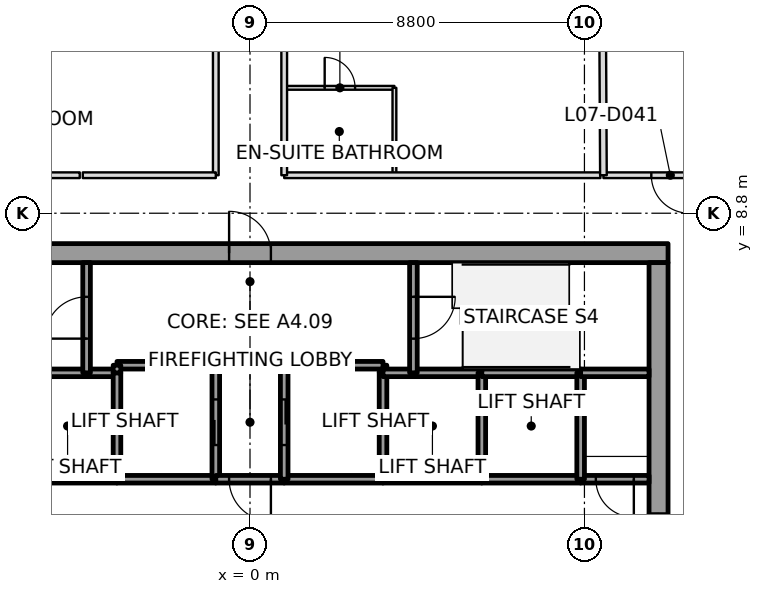
"""IFC4 building model, lengths in metres.
Left out: names, types, materials, properties, quantities, classifications, styles, units other than length and angle.
Written with IfcOpenShell. Run it as: python <this file> out.ifc"""

import sys

from ifc_helpers import new_model, si_unit, direction, frame, frame_2d, origin, place, context, subcontext, project, spatial, rectangle, extrude, element, fill, save


model = new_model("IFC4")
c1 = context("Model", 3, precision=1e-05, world=origin(), true_north=direction((0.0, 1.0)))
c2 = subcontext(c1, "Body", "Model", "MODEL_VIEW")
j1 = project(units=[si_unit("LENGTHUNIT", "METRE"), si_unit("PLANEANGLEUNIT", "RADIAN")], contexts=[c1])
p1 = place(None, origin())
s1 = spatial("IfcSite", under=j1, at=p1, CompositionType="ELEMENT")
p2 = place(p1, origin())
s2 = spatial("IfcBuilding", under=s1, at=p2, CompositionType="ELEMENT")
p3 = place(p2, frame((0.0, 0.0, 48.0)))
s3 = spatial("IfcBuildingStorey", under=s2, at=p3, CompositionType="ELEMENT", Elevation=48.0)
p4 = place(p3, frame((-11.0, 7.75, 0.0), z_axis=(0.0, 0.0, 1.0), x_axis=(1.0, 0.0, 0.0)))
e1 = element("IfcWall", 1, at=p4, inside=s3, PredefinedType="SHEAR", context=c2, shape_type="SweptSolid", body=[
    extrude(rectangle(XDim=22.0, YDim=0.5, at=frame_2d((11.0, 0.0))), origin(), (0.0, 0.0, 1.0), 3.7),
])
p5 = place(p4, frame((10.45, 0.0, 0.0)))
e2 = element("IfcOpeningElement", 2, at=p5, cuts=e1, PredefinedType="OPENING", context=c2, shape_type="SweptSolid", body=[
    extrude(rectangle(XDim=1.1, YDim=2.1, at=frame_2d((0.55, 1.05))), frame((0.0, 0.25, 0.0), z_axis=(0.0, -1.0, 0.0), x_axis=(1.0, 0.0, 0.0)), (0.0, 0.0, 1.0), 0.5),
])
p6 = place(p3, frame((10.75, -7.5, 0.0), z_axis=(0.0, 0.0, 1.0), x_axis=(0.0, 1.0, 0.0)))
e3 = element("IfcWall", 3, at=p6, inside=s3, PredefinedType="SHEAR", context=c2, shape_type="SweptSolid", body=[
    extrude(rectangle(XDim=15.0, YDim=0.5, at=frame_2d((7.5, 0.0))), origin(), (0.0, 0.0, 1.0), 3.7),
])
p7 = place(p6, frame((6.6, 0.0, 0.0)))
e4 = element("IfcOpeningElement", 4, at=p7, cuts=e3, PredefinedType="OPENING", context=c2, shape_type="SweptSolid", body=[
    extrude(rectangle(XDim=1.8, YDim=2.1, at=frame_2d((0.9, 1.05))), frame((0.0, 0.25, 0.0), z_axis=(0.0, -1.0, 0.0), x_axis=(1.0, 0.0, 0.0)), (0.0, 0.0, 1.0), 0.5),
])
p8 = place(p3, frame((-3.5, 1.8, 0.0), z_axis=(0.0, 0.0, 1.0), x_axis=(-1.0, 0.0, 0.0)))
e5 = element("IfcWall", 5, at=p8, inside=s3, PredefinedType="SOLIDWALL", context=c2, shape_type="SweptSolid", body=[
    extrude(rectangle(XDim=2.6, YDim=0.2, at=frame_2d((1.3, 0.0))), origin(), (0.0, 0.0, 1.0), 3.55),
])
p9 = place(p3, frame((-4.3, 4.6, 0.0), z_axis=(0.0, 0.0, 1.0), x_axis=(-1.0, 0.0, 0.0)))
e6 = element("IfcWall", 6, at=p9, inside=s3, PredefinedType="SOLIDWALL", context=c2, shape_type="SweptSolid", body=[
    extrude(rectangle(XDim=1.8, YDim=0.2, at=frame_2d((0.9, 0.0))), origin(), (0.0, 0.0, 1.0), 3.55),
])
p10 = place(p3, frame((-3.5, 4.6, 0.0), z_axis=(0.0, 0.0, 1.0), x_axis=(-1.0, 0.0, 0.0)))
e7 = element("IfcWall", 7, at=p10, inside=s3, PredefinedType="SOLIDWALL", context=c2, shape_type="SweptSolid", body=[
    extrude(rectangle(XDim=0.8, YDim=0.2, at=frame_2d((0.4, 0.0))), origin(), (0.0, 0.0, 1.0), 3.55),
])
p11 = place(p3, frame((-4.3, 4.6, 0.0), z_axis=(0.0, 0.0, 1.0), x_axis=(0.0, 1.0, 0.0)))
e8 = element("IfcWall", 8, at=p11, inside=s3, PredefinedType="SOLIDWALL", context=c2, shape_type="SweptSolid", body=[
    extrude(rectangle(XDim=2.9, YDim=0.2, at=frame_2d((1.45, 0.0))), origin(), (0.0, 0.0, 1.0), 3.55),
])
p12 = place(p11, frame((0.9, 0.0, 0.0)))
e9 = element("IfcOpeningElement", 9, at=p12, cuts=e8, PredefinedType="OPENING", context=c2, shape_type="SweptSolid", body=[
    extrude(rectangle(XDim=1.1, YDim=2.1, at=frame_2d((0.55, 1.05))), frame((0.0, 0.1, 0.0), z_axis=(0.0, -1.0, 0.0), x_axis=(1.0, 0.0, 0.0)), (0.0, 0.0, 1.0), 0.2),
])
p13 = place(p3, frame((-0.9, 1.8, 0.0), z_axis=(0.0, 0.0, 1.0), x_axis=(-1.0, 0.0, 0.0)))
e10 = element("IfcWall", 10, at=p13, inside=s3, PredefinedType="SOLIDWALL", context=c2, shape_type="SweptSolid", body=[
    extrude(rectangle(XDim=2.6, YDim=0.2, at=frame_2d((1.3, 0.0))), origin(), (0.0, 0.0, 1.0), 3.55),
])
p14 = place(p3, frame((-3.5, 4.6, 0.0), z_axis=(0.0, 0.0, 1.0), x_axis=(0.0, -1.0, 0.0)))
e11 = element("IfcWall", 11, at=p14, inside=s3, PredefinedType="SOLIDWALL", context=c2, shape_type="SweptSolid", body=[
    extrude(rectangle(XDim=2.8, YDim=0.2, at=frame_2d((1.4, 0.0))), origin(), (0.0, 0.0, 1.0), 3.55),
])
p15 = place(p3, frame((-0.9, 1.8, 0.0), z_axis=(0.0, 0.0, 1.0), x_axis=(0.0, 1.0, 0.0)))
e12 = element("IfcWall", 12, at=p15, inside=s3, PredefinedType="SOLIDWALL", context=c2, shape_type="SweptSolid", body=[
    extrude(rectangle(XDim=3.0, YDim=0.2, at=frame_2d((1.5, 0.0))), origin(), (0.0, 0.0, 1.0), 3.55),
])
p16 = place(p15, frame((0.9, 0.0, 0.0)))
e13 = element("IfcOpeningElement", 13, at=p16, cuts=e12, PredefinedType="OPENING", context=c2, shape_type="SweptSolid", body=[
    extrude(rectangle(XDim=1.2, YDim=2.1, at=frame_2d((0.6, 1.05))), frame((0.0, 0.1, 0.0), z_axis=(0.0, -1.0, 0.0), x_axis=(1.0, 0.0, 0.0)), (0.0, 0.0, 1.0), 0.2),
])
p17 = place(p3, frame((-0.9, 4.8, 0.0), z_axis=(0.0, 0.0, 1.0), x_axis=(-1.0, 0.0, 0.0)))
e14 = element("IfcWall", 14, at=p17, inside=s3, PredefinedType="SOLIDWALL", context=c2, shape_type="SweptSolid", body=[
    extrude(rectangle(XDim=2.6, YDim=0.2, at=frame_2d((1.3, 0.0))), origin(), (0.0, 0.0, 1.0), 3.55),
])
p18 = place(p3, frame((-3.5, 4.8, 0.0), z_axis=(0.0, 0.0, 1.0), x_axis=(0.0, -1.0, 0.0)))
e15 = element("IfcWall", 15, at=p18, inside=s3, PredefinedType="SOLIDWALL", context=c2, shape_type="SweptSolid", body=[
    extrude(rectangle(XDim=0.2, YDim=0.2, at=frame_2d((0.1, 0.0))), origin(), (0.0, 0.0, 1.0), 3.55),
])
p19 = place(p3, frame((0.9, 1.8, 0.0), z_axis=(0.0, 0.0, 1.0), x_axis=(-1.0, 0.0, 0.0)))
e16 = element("IfcWall", 16, at=p19, inside=s3, PredefinedType="SOLIDWALL", context=c2, shape_type="SweptSolid", body=[
    extrude(rectangle(XDim=1.8, YDim=0.2, at=frame_2d((0.9, 0.0))), origin(), (0.0, 0.0, 1.0), 3.55),
])
p20 = place(p19, frame((0.35, 0.0, 0.0)))
e17 = element("IfcOpeningElement", 17, at=p20, cuts=e16, PredefinedType="OPENING", context=c2, shape_type="SweptSolid", body=[
    extrude(rectangle(XDim=1.1, YDim=2.1, at=frame_2d((0.55, 1.05))), frame((0.0, 0.1, 0.0), z_axis=(0.0, -1.0, 0.0), x_axis=(1.0, 0.0, 0.0)), (0.0, 0.0, 1.0), 0.2),
])
p21 = place(p3, frame((3.5, 1.8, 0.0), z_axis=(0.0, 0.0, 1.0), x_axis=(-1.0, 0.0, 0.0)))
e18 = element("IfcWall", 18, at=p21, inside=s3, PredefinedType="SOLIDWALL", context=c2, shape_type="SweptSolid", body=[
    extrude(rectangle(XDim=2.6, YDim=0.2, at=frame_2d((1.3, 0.0))), origin(), (0.0, 0.0, 1.0), 3.55),
])
p22 = place(p3, frame((3.5, 4.6, 0.0), z_axis=(0.0, 0.0, 1.0), x_axis=(0.0, 1.0, 0.0)))
e19 = element("IfcWall", 19, at=p22, inside=s3, PredefinedType="SOLIDWALL", context=c2, shape_type="SweptSolid", body=[
    extrude(rectangle(XDim=0.2, YDim=0.2, at=frame_2d((0.1, 0.0))), origin(), (0.0, 0.0, 1.0), 3.55),
])
p23 = place(p3, frame((3.5, 4.8, 0.0), z_axis=(0.0, 0.0, 1.0), x_axis=(-1.0, 0.0, 0.0)))
e20 = element("IfcWall", 20, at=p23, inside=s3, PredefinedType="SOLIDWALL", context=c2, shape_type="SweptSolid", body=[
    extrude(rectangle(XDim=2.6, YDim=0.2, at=frame_2d((1.3, 0.0))), origin(), (0.0, 0.0, 1.0), 3.55),
])
p24 = place(p3, frame((0.9, 4.8, 0.0), z_axis=(0.0, 0.0, 1.0), x_axis=(0.0, -1.0, 0.0)))
e21 = element("IfcWall", 21, at=p24, inside=s3, PredefinedType="SOLIDWALL", context=c2, shape_type="SweptSolid", body=[
    extrude(rectangle(XDim=3.0, YDim=0.2, at=frame_2d((1.5, 0.0))), origin(), (0.0, 0.0, 1.0), 3.55),
])
p25 = place(p24, frame((0.9, 0.0, 0.0)))
e22 = element("IfcOpeningElement", 22, at=p25, cuts=e21, PredefinedType="OPENING", context=c2, shape_type="SweptSolid", body=[
    extrude(rectangle(XDim=1.2, YDim=2.1, at=frame_2d((0.6, 1.05))), frame((0.0, 0.1, 0.0), z_axis=(0.0, -1.0, 0.0), x_axis=(1.0, 0.0, 0.0)), (0.0, 0.0, 1.0), 0.2),
])
p26 = place(p3, frame((6.1, 1.8, 0.0), z_axis=(0.0, 0.0, 1.0), x_axis=(-1.0, 0.0, 0.0)))
e23 = element("IfcWall", 23, at=p26, inside=s3, PredefinedType="SOLIDWALL", context=c2, shape_type="SweptSolid", body=[
    extrude(rectangle(XDim=2.6, YDim=0.2, at=frame_2d((1.3, 0.0))), origin(), (0.0, 0.0, 1.0), 3.55),
])
p27 = place(p3, frame((3.5, 1.8, 0.0), z_axis=(0.0, 0.0, 1.0), x_axis=(0.0, 1.0, 0.0)))
e24 = element("IfcWall", 24, at=p27, inside=s3, PredefinedType="SOLIDWALL", context=c2, shape_type="SweptSolid", body=[
    extrude(rectangle(XDim=2.8, YDim=0.2, at=frame_2d((1.4, 0.0))), origin(), (0.0, 0.0, 1.0), 3.55),
])
p28 = place(p3, frame((4.3, 4.6, 0.0), z_axis=(0.0, 0.0, 1.0), x_axis=(-1.0, 0.0, 0.0)))
e25 = element("IfcWall", 25, at=p28, inside=s3, PredefinedType="SOLIDWALL", context=c2, shape_type="SweptSolid", body=[
    extrude(rectangle(XDim=0.8, YDim=0.2, at=frame_2d((0.4, 0.0))), origin(), (0.0, 0.0, 1.0), 3.55),
])
p29 = place(p3, frame((6.1, 4.6, 0.0), z_axis=(0.0, 0.0, 1.0), x_axis=(-1.0, 0.0, 0.0)))
e26 = element("IfcWall", 26, at=p29, inside=s3, PredefinedType="SOLIDWALL", context=c2, shape_type="SweptSolid", body=[
    extrude(rectangle(XDim=1.8, YDim=0.2, at=frame_2d((0.9, 0.0))), origin(), (0.0, 0.0, 1.0), 3.55),
])
p30 = place(p3, frame((4.3, 7.5, 0.0), z_axis=(0.0, 0.0, 1.0), x_axis=(0.0, -1.0, 0.0)))
e27 = element("IfcWall", 27, at=p30, inside=s3, PredefinedType="SOLIDWALL", context=c2, shape_type="SweptSolid", body=[
    extrude(rectangle(XDim=2.9, YDim=0.2, at=frame_2d((1.45, 0.0))), origin(), (0.0, 0.0, 1.0), 3.55),
])
p31 = place(p30, frame((0.9, 0.0, 0.0)))
e28 = element("IfcOpeningElement", 28, at=p31, cuts=e27, PredefinedType="OPENING", context=c2, shape_type="SweptSolid", body=[
    extrude(rectangle(XDim=1.1, YDim=2.1, at=frame_2d((0.55, 1.05))), frame((0.0, 0.1, 0.0), z_axis=(0.0, -1.0, 0.0), x_axis=(1.0, 0.0, 0.0)), (0.0, 0.0, 1.0), 0.2),
])
p32 = place(p3, frame((8.7, 1.8, 0.0), z_axis=(0.0, 0.0, 1.0), x_axis=(-1.0, 0.0, 0.0)))
e29 = element("IfcWall", 29, at=p32, inside=s3, PredefinedType="SOLIDWALL", context=c2, shape_type="SweptSolid", body=[
    extrude(rectangle(XDim=2.6, YDim=0.2, at=frame_2d((1.3, 0.0))), origin(), (0.0, 0.0, 1.0), 3.55),
])
p33 = place(p3, frame((6.1, 1.8, 0.0), z_axis=(0.0, 0.0, 1.0), x_axis=(0.0, 1.0, 0.0)))
e30 = element("IfcWall", 30, at=p33, inside=s3, PredefinedType="SOLIDWALL", context=c2, shape_type="SweptSolid", body=[
    extrude(rectangle(XDim=2.8, YDim=0.2, at=frame_2d((1.4, 0.0))), origin(), (0.0, 0.0, 1.0), 3.55),
])
p34 = place(p3, frame((8.7, 4.6, 0.0), z_axis=(0.0, 0.0, 1.0), x_axis=(-1.0, 0.0, 0.0)))
e31 = element("IfcWall", 31, at=p34, inside=s3, PredefinedType="SOLIDWALL", context=c2, shape_type="SweptSolid", body=[
    extrude(rectangle(XDim=2.6, YDim=0.2, at=frame_2d((1.3, 0.0))), origin(), (0.0, 0.0, 1.0), 3.55),
])
p35 = place(p3, frame((10.5, 1.8, 0.0), z_axis=(0.0, 0.0, 1.0), x_axis=(-1.0, 0.0, 0.0)))
e32 = element("IfcWall", 32, at=p35, inside=s3, PredefinedType="SOLIDWALL", context=c2, shape_type="SweptSolid", body=[
    extrude(rectangle(XDim=1.8, YDim=0.2, at=frame_2d((0.9, 0.0))), origin(), (0.0, 0.0, 1.0), 3.55),
])
p36 = place(p35, frame((0.4, 0.0, 0.0)))
e33 = element("IfcOpeningElement", 33, at=p36, cuts=e32, PredefinedType="OPENING", context=c2, shape_type="SweptSolid", body=[
    extrude(rectangle(XDim=1.0, YDim=2.1, at=frame_2d((0.5, 1.05))), frame((0.0, 0.1, 0.0), z_axis=(0.0, -1.0, 0.0), x_axis=(1.0, 0.0, 0.0)), (0.0, 0.0, 1.0), 0.2),
])
p37 = place(p3, frame((8.7, 4.6, 0.0), z_axis=(0.0, 0.0, 1.0), x_axis=(0.0, -1.0, 0.0)))
e34 = element("IfcWall", 34, at=p37, inside=s3, PredefinedType="SOLIDWALL", context=c2, shape_type="SweptSolid", body=[
    extrude(rectangle(XDim=2.8, YDim=0.2, at=frame_2d((1.4, 0.0))), origin(), (0.0, 0.0, 1.0), 3.55),
])
p38 = place(p3, frame((10.5, 4.6, 0.0), z_axis=(0.0, 0.0, 1.0), x_axis=(-1.0, 0.0, 0.0)))
e35 = element("IfcWall", 35, at=p38, inside=s3, PredefinedType="SOLIDWALL", context=c2, shape_type="SweptSolid", body=[
    extrude(rectangle(XDim=1.8, YDim=0.2, at=frame_2d((0.9, 0.0))), origin(), (0.0, 0.0, 1.0), 3.55),
])
p39 = place(p3, frame((9.206, 27.667, 0.0), z_axis=(0.0, 0.0, 1.0), x_axis=(0.005288111679, -0.99998601784, 0.0)))
e36 = element("IfcWall", 36, at=p39, inside=s3, PredefinedType="PARTITIONING", context=c2, shape_type="SweptSolid", body=[
    extrude(rectangle(XDim=17.867, YDim=0.175, at=frame_2d((8.934, 0.0))), origin(), (0.0, 0.0, 1.0), 2.947),
])
p40 = place(p3, frame((-4.48, 9.8, 0.0), z_axis=(0.0, 0.0, 1.0), x_axis=(-1.0, 0.0, 0.0)))
e37 = element("IfcWall", 37, at=p40, inside=s3, PredefinedType="PARTITIONING", context=c2, shape_type="SweptSolid", body=[
    extrude(rectangle(XDim=8.24, YDim=0.15, at=frame_2d((4.12, 0.0))), origin(), (0.0, 0.0, 1.0), 3.017),
])
p41 = place(p40, frame((6.93, 0.0, 0.0)))
e38 = element("IfcOpeningElement", 38, at=p41, cuts=e37, PredefinedType="OPENING", context=c2, shape_type="SweptSolid", body=[
    extrude(rectangle(XDim=1.0, YDim=2.1, at=frame_2d((0.5, 1.05))), frame((0.0, 0.075, 0.0), z_axis=(0.0, -1.0, 0.0), x_axis=(1.0, 0.0, 0.0)), (0.0, 0.0, 1.0), 0.15),
])
p42 = place(p3, frame((-0.9, 27.756, 0.0), z_axis=(0.0, 0.0, 1.0), x_axis=(0.0, -1.0, 0.0)))
e39 = element("IfcWall", 39, at=p42, inside=s3, PredefinedType="PARTITIONING", context=c2, shape_type="SweptSolid", body=[
    extrude(rectangle(XDim=17.956, YDim=0.15, at=frame_2d((8.978, 0.0))), origin(), (0.0, 0.0, 1.0), 2.947),
])
p43 = place(p42, frame((9.678, 0.0, 0.0)))
e40 = element("IfcOpeningElement", 40, at=p43, cuts=e39, PredefinedType="OPENING", context=c2, shape_type="SweptSolid", body=[
    extrude(rectangle(XDim=1.0, YDim=2.1, at=frame_2d((0.5, 1.05))), frame((0.0, 0.075, 0.0), z_axis=(0.0, -1.0, 0.0), x_axis=(1.0, 0.0, 0.0)), (0.0, 0.0, 1.0), 0.15),
])
p44 = place(p3, frame((-0.9, 9.8, 0.0), z_axis=(0.0, 0.0, 1.0), x_axis=(-1.0, 0.0, 0.0)))
e41 = element("IfcWall", 41, at=p44, inside=s3, PredefinedType="PARTITIONING", context=c2, shape_type="SweptSolid", body=[
    extrude(rectangle(XDim=3.5, YDim=0.15, at=frame_2d((1.75, 0.0))), origin(), (0.0, 0.0, 1.0), 2.947),
])
p45 = place(p3, frame((9.22, 9.8, 0.0), z_axis=(0.0, 0.0, 1.0), x_axis=(-1.0, 0.0, 0.0)))
e42 = element("IfcWall", 42, at=p45, inside=s3, PredefinedType="PARTITIONING", context=c2, shape_type="SweptSolid", body=[
    extrude(rectangle(XDim=8.32, YDim=0.15, at=frame_2d((4.16, 0.0))), origin(), (0.0, 0.0, 1.0), 2.947),
])
p46 = place(p3, frame((0.9, 9.8, 0.0), z_axis=(0.0, 0.0, 1.0), x_axis=(0.0, 1.0, 0.0)))
e43 = element("IfcWall", 43, at=p46, inside=s3, PredefinedType="PARTITIONING", context=c2, shape_type="SweptSolid", body=[
    extrude(rectangle(XDim=17.956, YDim=0.15, at=frame_2d((8.978, 0.0))), origin(), (0.0, 0.0, 1.0), 2.947),
])
p47 = place(p46, frame((9.678, 0.0, 0.0)))
e44 = element("IfcOpeningElement", 44, at=p47, cuts=e43, PredefinedType="OPENING", context=c2, shape_type="SweptSolid", body=[
    extrude(rectangle(XDim=1.0, YDim=2.1, at=frame_2d((0.5, 1.05))), frame((0.0, 0.075, 0.0), z_axis=(0.0, -1.0, 0.0), x_axis=(1.0, 0.0, 0.0)), (0.0, 0.0, 1.0), 0.15),
])
p48 = place(p3, frame((12.72, 9.8, 0.0), z_axis=(0.0, 0.0, 1.0), x_axis=(-1.0, 0.0, 0.0)))
e45 = element("IfcWall", 45, at=p48, inside=s3, PredefinedType="PARTITIONING", context=c2, shape_type="SweptSolid", body=[
    extrude(rectangle(XDim=3.42, YDim=0.15, at=frame_2d((1.71, 0.0))), origin(), (0.0, 0.0, 1.0), 3.017),
])
p49 = place(p48, frame((1.16, 0.0, 0.0)))
e46 = element("IfcOpeningElement", 46, at=p49, cuts=e45, PredefinedType="OPENING", context=c2, shape_type="SweptSolid", body=[
    extrude(rectangle(XDim=1.0, YDim=2.1, at=frame_2d((0.5, 1.05))), frame((0.0, 0.075, 0.0), z_axis=(0.0, -1.0, 0.0), x_axis=(1.0, 0.0, 0.0)), (0.0, 0.0, 1.0), 0.15),
])
p50 = place(p3, frame((0.93, 12.1, 0.0), z_axis=(0.0, 0.0, 1.0), x_axis=(1.0, 0.0, 0.0)))
e47 = element("IfcWall", 47, at=p50, inside=s3, PredefinedType="PARTITIONING", context=c2, shape_type="SweptSolid", body=[
    extrude(rectangle(XDim=2.87, YDim=0.1, at=frame_2d((1.435, 0.0))), origin(), (0.0, 0.0, 1.0), 3.15),
])
p51 = place(p50, frame((1.035, 0.0, 0.0)))
e48 = element("IfcOpeningElement", 48, at=p51, cuts=e47, PredefinedType="OPENING", context=c2, shape_type="SweptSolid", body=[
    extrude(rectangle(XDim=0.8, YDim=2.1, at=frame_2d((0.4, 1.05))), frame((0.0, 0.05, 0.0), z_axis=(0.0, -1.0, 0.0), x_axis=(1.0, 0.0, 0.0)), (0.0, 0.0, 1.0), 0.1),
])
p52 = place(p3, frame((3.8, 12.1, 0.0), z_axis=(0.0, 0.0, 1.0), x_axis=(0.0, -1.0, 0.0)))
e49 = element("IfcWall", 49, at=p52, inside=s3, PredefinedType="PARTITIONING", context=c2, shape_type="SweptSolid", body=[
    extrude(rectangle(XDim=2.27, YDim=0.1, at=frame_2d((1.135, 0.0))), origin(), (0.0, 0.0, 1.0), 3.15),
])
p53 = place(p49, origin())
e50 = element("IfcDoor", 50, at=p53, inside=s3, OperationType="SINGLE_SWING_RIGHT", PredefinedType="DOOR", context=c2, shape_type="SweptSolid", body=[
    extrude(rectangle(XDim=1.0, YDim=2.1, at=frame_2d((0.5, 1.05))), frame((0.0, 0.025, 0.0), z_axis=(0.0, -1.0, 0.0), x_axis=(1.0, 0.0, 0.0)), (0.0, 0.0, 1.0), 0.05),
])
fill(e46, e50)
p54 = place(p51, origin())
e51 = element("IfcDoor", 51, at=p54, inside=s3, OperationType="SINGLE_SWING_LEFT", PredefinedType="DOOR", context=c2, shape_type="SweptSolid", body=[
    extrude(rectangle(XDim=0.8, YDim=2.1, at=frame_2d((0.4, 1.05))), frame((0.0, 0.025, 0.0), z_axis=(0.0, -1.0, 0.0), x_axis=(1.0, 0.0, 0.0)), (0.0, 0.0, 1.0), 0.05),
])
fill(e48, e51)
p55 = place(p16, origin())
e52 = element("IfcDoor", 52, at=p55, inside=s3, OperationType="SLIDING_TO_LEFT", PredefinedType="DOOR", context=c2, shape_type="SweptSolid", body=[
    extrude(rectangle(XDim=1.2, YDim=2.1, at=frame_2d((0.6, 1.05))), frame((0.0, 0.025, 0.0), z_axis=(0.0, -1.0, 0.0), x_axis=(1.0, 0.0, 0.0)), (0.0, 0.0, 1.0), 0.05),
])
fill(e13, e52)
p56 = place(p25, origin())
e53 = element("IfcDoor", 53, at=p56, inside=s3, OperationType="SLIDING_TO_RIGHT", PredefinedType="DOOR", context=c2, shape_type="SweptSolid", body=[
    extrude(rectangle(XDim=1.2, YDim=2.1, at=frame_2d((0.6, 1.05))), frame((0.0, 0.025, 0.0), z_axis=(0.0, -1.0, 0.0), x_axis=(1.0, 0.0, 0.0)), (0.0, 0.0, 1.0), 0.05),
])
fill(e22, e53)
p57 = place(p20, origin())
e54 = element("IfcDoor", 54, at=p57, inside=s3, OperationType="SINGLE_SWING_LEFT", PredefinedType="DOOR", context=c2, shape_type="SweptSolid", body=[
    extrude(rectangle(XDim=1.1, YDim=2.1, at=frame_2d((0.55, 1.05))), frame((0.0, 0.025, 0.0), z_axis=(0.0, -1.0, 0.0), x_axis=(1.0, 0.0, 0.0)), (0.0, 0.0, 1.0), 0.05),
])
fill(e17, e54)
p58 = place(p36, origin())
e55 = element("IfcDoor", 55, at=p58, inside=s3, OperationType="SINGLE_SWING_RIGHT", PredefinedType="DOOR", context=c2, shape_type="SweptSolid", body=[
    extrude(rectangle(XDim=1.0, YDim=2.1, at=frame_2d((0.5, 1.05))), frame((0.0, 0.025, 0.0), z_axis=(0.0, -1.0, 0.0), x_axis=(1.0, 0.0, 0.0)), (0.0, 0.0, 1.0), 0.05),
])
fill(e33, e55)
p59 = place(p12, origin())
e56 = element("IfcDoor", 56, at=p59, inside=s3, OperationType="SINGLE_SWING_LEFT", PredefinedType="DOOR", context=c2, shape_type="SweptSolid", body=[
    extrude(rectangle(XDim=1.1, YDim=2.1, at=frame_2d((0.55, 1.05))), frame((0.0, 0.025, 0.0), z_axis=(0.0, -1.0, 0.0), x_axis=(1.0, 0.0, 0.0)), (0.0, 0.0, 1.0), 0.05),
])
fill(e9, e56)
p60 = place(p31, origin())
e57 = element("IfcDoor", 57, at=p60, inside=s3, OperationType="SINGLE_SWING_RIGHT", PredefinedType="DOOR", context=c2, shape_type="SweptSolid", body=[
    extrude(rectangle(XDim=1.1, YDim=2.1, at=frame_2d((0.55, 1.05))), frame((0.0, 0.025, 0.0), z_axis=(0.0, -1.0, 0.0), x_axis=(1.0, 0.0, 0.0)), (0.0, 0.0, 1.0), 0.05),
])
fill(e28, e57)
p61 = place(p7, origin())
e58 = element("IfcDoor", 58, at=p61, inside=s3, OperationType="DOUBLE_DOOR_SINGLE_SWING", PredefinedType="DOOR", context=c2, shape_type="SweptSolid", body=[
    extrude(rectangle(XDim=1.8, YDim=2.1, at=frame_2d((0.9, 1.05))), frame((0.0, 0.025, 0.0), z_axis=(0.0, -1.0, 0.0), x_axis=(1.0, 0.0, 0.0)), (0.0, 0.0, 1.0), 0.05),
])
fill(e4, e58)
p62 = place(p5, origin())
e59 = element("IfcDoor", 59, at=p62, inside=s3, OperationType="SINGLE_SWING_RIGHT", PredefinedType="DOOR", context=c2, shape_type="SweptSolid", body=[
    extrude(rectangle(XDim=1.1, YDim=2.1, at=frame_2d((0.55, 1.05))), frame((0.0, 0.025, 0.0), z_axis=(0.0, -1.0, 0.0), x_axis=(1.0, 0.0, 0.0)), (0.0, 0.0, 1.0), 0.05),
])
fill(e2, e59)
save(model, sys.argv[1])
